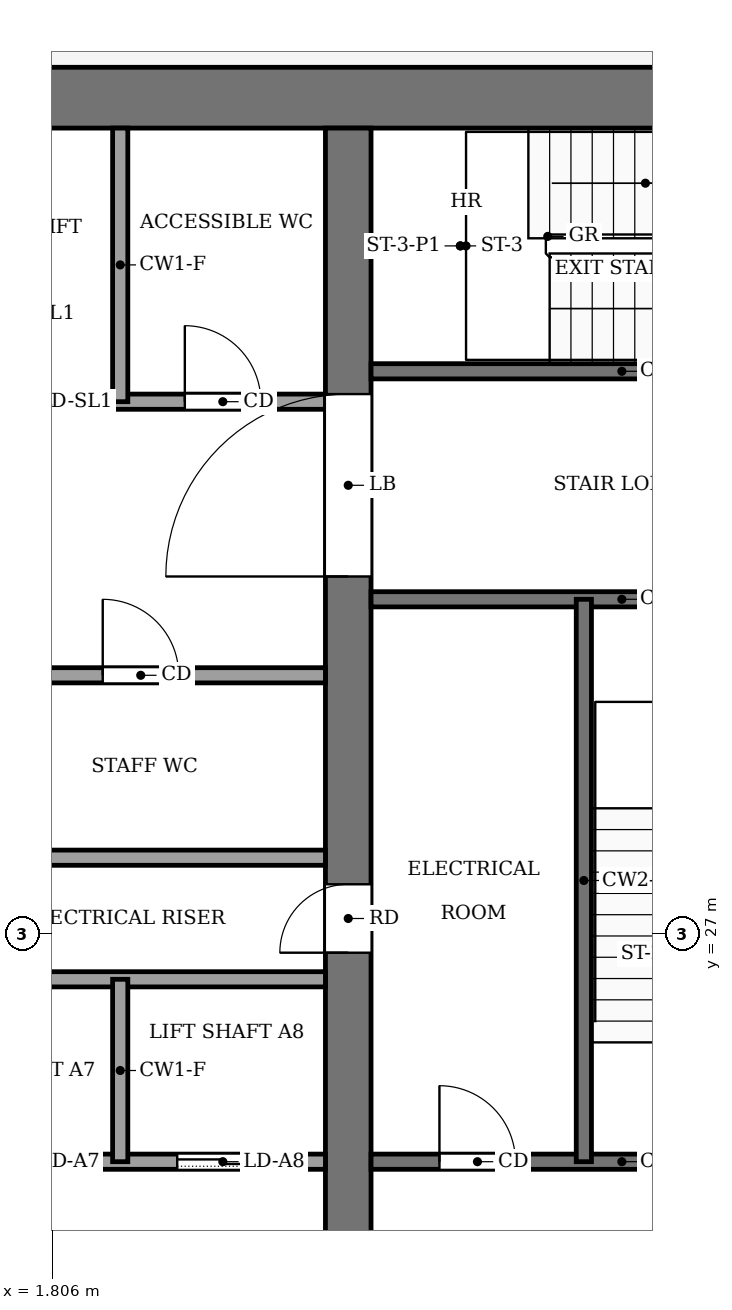
"""IFC4 building model, lengths in metres.
Left out: names, types, materials, properties, quantities, classifications, styles, units other than length and angle.
Written with IfcOpenShell. Run it as: python <this file> out.ifc"""

import sys

from ifc_helpers import new_model, si_unit, direction, frame, frame_2d, origin, place, context, subcontext, project, spatial, rectangle, extrude, element, fill, save


model = new_model("IFC4")
c1 = context("Model", 3, precision=1e-05, world=origin(), true_north=direction((0.0, 1.0)))
c2 = subcontext(c1, "Body", "Model", "MODEL_VIEW")
j1 = project(units=[si_unit("LENGTHUNIT", "METRE"), si_unit("PLANEANGLEUNIT", "RADIAN")], contexts=[c1])
p1 = place(None, origin())
s1 = spatial("IfcSite", under=j1, at=p1, CompositionType="ELEMENT")
p2 = place(p1, origin())
s2 = spatial("IfcBuilding", under=s1, at=p2, CompositionType="ELEMENT")
p3 = place(p2, frame((0.0, 0.0, 242.0)))
s3 = spatial("IfcBuildingStorey", under=s2, at=p3, CompositionType="ELEMENT", Elevation=242.0)
p4 = place(p3, frame((-13.4, 38.0, -0.13), z_axis=(0.0, 0.0, 1.0), x_axis=(1.0, 0.0, 0.0)))
e1 = element("IfcWall", 1, at=p4, inside=s3, PredefinedType="SHEAR", context=c2, shape_type="SweptSolid", body=[
    extrude(rectangle(XDim=26.8, YDim=0.8, at=frame_2d((13.4, 0.0))), origin(), (0.0, 0.0, 1.0), 4.0),
])
p5 = place(p3, frame((5.7, 18.4, -0.13), z_axis=(0.0, 0.0, 1.0), x_axis=(0.0, 1.0, 0.0)))
e2 = element("IfcWall", 2, at=p5, inside=s3, PredefinedType="SHEAR", context=c2, shape_type="SweptSolid", body=[
    extrude(rectangle(XDim=19.2, YDim=0.6, at=frame_2d((9.6, 0.0))), origin(), (0.0, 0.0, 1.0), 4.0),
])
p6 = place(p5, frame((8.35, 0.0, 0.13)))
e3 = element("IfcOpeningElement", 3, at=p6, cuts=e2, PredefinedType="OPENING", context=c2, shape_type="SweptSolid", body=[
    extrude(rectangle(XDim=0.9, YDim=2.1, at=frame_2d((0.45, 1.05))), frame((0.0, 0.31, 0.0), z_axis=(0.0, -1.0, 0.0), x_axis=(1.0, 0.0, 0.0)), (0.0, 0.0, 1.0), 0.62),
])
p7 = place(p5, frame((13.3, 0.0, 0.13)))
e4 = element("IfcOpeningElement", 4, at=p7, cuts=e2, PredefinedType="OPENING", context=c2, shape_type="SweptSolid", body=[
    extrude(rectangle(XDim=2.4, YDim=2.4, at=frame_2d((1.2, 1.2))), frame((0.0, 0.31, 0.0), z_axis=(0.0, -1.0, 0.0), x_axis=(1.0, 0.0, 0.0)), (0.0, 0.0, 1.0), 0.62),
])
p8 = place(p3, frame((-5.4, 24.0, 0.0), z_axis=(0.0, 0.0, 1.0), x_axis=(1.0, 0.0, 0.0)))
e5 = element("IfcWall", 5, at=p8, inside=s3, PredefinedType="PARTITIONING", context=c2, shape_type="SweptSolid", body=[
    extrude(rectangle(XDim=10.8, YDim=0.2, at=frame_2d((5.4, 0.0))), origin(), (0.0, 0.0, 1.0), 3.87),
])
p9 = place(p8, frame((0.75, 0.0, 0.0)))
e6 = element("IfcOpeningElement", 6, at=p9, cuts=e5, PredefinedType="OPENING", context=c2, shape_type="SweptSolid", body=[
    extrude(rectangle(XDim=1.2, YDim=2.2, at=frame_2d((0.6, 1.1))), frame((0.0, 0.11, 0.0), z_axis=(0.0, -1.0, 0.0), x_axis=(1.0, 0.0, 0.0)), (0.0, 0.0, 1.0), 0.22),
])
p10 = place(p8, frame((3.45, 0.0, 0.0)))
e7 = element("IfcOpeningElement", 7, at=p10, cuts=e5, PredefinedType="OPENING", context=c2, shape_type="SweptSolid", body=[
    extrude(rectangle(XDim=1.2, YDim=2.2, at=frame_2d((0.6, 1.1))), frame((0.0, 0.11, 0.0), z_axis=(0.0, -1.0, 0.0), x_axis=(1.0, 0.0, 0.0)), (0.0, 0.0, 1.0), 0.22),
])
p11 = place(p8, frame((6.15, 0.0, 0.0)))
e8 = element("IfcOpeningElement", 8, at=p11, cuts=e5, PredefinedType="OPENING", context=c2, shape_type="SweptSolid", body=[
    extrude(rectangle(XDim=1.2, YDim=2.2, at=frame_2d((0.6, 1.1))), frame((0.0, 0.11, 0.0), z_axis=(0.0, -1.0, 0.0), x_axis=(1.0, 0.0, 0.0)), (0.0, 0.0, 1.0), 0.22),
])
p12 = place(p8, frame((8.85, 0.0, 0.0)))
e9 = element("IfcOpeningElement", 9, at=p12, cuts=e5, PredefinedType="OPENING", context=c2, shape_type="SweptSolid", body=[
    extrude(rectangle(XDim=1.2, YDim=2.2, at=frame_2d((0.6, 1.1))), frame((0.0, 0.11, 0.0), z_axis=(0.0, -1.0, 0.0), x_axis=(1.0, 0.0, 0.0)), (0.0, 0.0, 1.0), 0.22),
])
p13 = place(p3, frame((6.0, 24.0, 0.0), z_axis=(0.0, 0.0, 1.0), x_axis=(1.0, 0.0, 0.0)))
e10 = element("IfcWall", 10, at=p13, inside=s3, PredefinedType="PARTITIONING", context=c2, shape_type="SweptSolid", body=[
    extrude(rectangle(XDim=6.6, YDim=0.2, at=frame_2d((3.3, 0.0))), origin(), (0.0, 0.0, 1.0), 3.87),
])
p14 = place(p13, frame((0.9, 0.0, 0.0)))
e11 = element("IfcOpeningElement", 11, at=p14, cuts=e10, PredefinedType="OPENING", context=c2, shape_type="SweptSolid", body=[
    extrude(rectangle(XDim=1.0, YDim=2.1, at=frame_2d((0.5, 1.05))), frame((0.0, 0.11, 0.0), z_axis=(0.0, -1.0, 0.0), x_axis=(1.0, 0.0, 0.0)), (0.0, 0.0, 1.0), 0.22),
])
p15 = place(p13, frame((4.4, 0.0, 0.0)))
e12 = element("IfcOpeningElement", 12, at=p15, cuts=e10, PredefinedType="OPENING", context=c2, shape_type="SweptSolid", body=[
    extrude(rectangle(XDim=1.2, YDim=2.2, at=frame_2d((0.6, 1.1))), frame((0.0, 0.11, 0.0), z_axis=(0.0, -1.0, 0.0), x_axis=(1.0, 0.0, 0.0)), (0.0, 0.0, 1.0), 0.22),
])
for number, where, z_axis, x_axis in (
    (13, (-5.4, 26.4, 0.0), (0.0, 0.0, 1.0), (1.0, 0.0, 0.0)),
    (14, (-5.4, 28.0, 0.0), (0.0, 0.0, 1.0), (1.0, 0.0, 0.0)),
):
    element("IfcWall", number, at=place(p3, frame(where, z_axis=z_axis, x_axis=x_axis)), inside=s3, PredefinedType="PARTITIONING", context=c2, shape_type="SweptSolid", body=[
        extrude(rectangle(XDim=10.8, YDim=0.2, at=frame_2d((5.4, 0.0))), origin(), (0.0, 0.0, 1.0), 3.87),
    ])
p16 = place(p3, frame((-5.4, 30.4, 0.0), z_axis=(0.0, 0.0, 1.0), x_axis=(1.0, 0.0, 0.0)))
e15 = element("IfcWall", 15, at=p16, inside=s3, PredefinedType="PARTITIONING", context=c2, shape_type="SweptSolid", body=[
    extrude(rectangle(XDim=10.8, YDim=0.2, at=frame_2d((5.4, 0.0))), origin(), (0.0, 0.0, 1.0), 3.87),
])
p17 = place(p16, frame((2.47, 0.0, 0.0)))
e16 = element("IfcOpeningElement", 16, at=p17, cuts=e15, PredefinedType="OPENING", context=c2, shape_type="SweptSolid", body=[
    extrude(rectangle(XDim=1.0, YDim=2.1, at=frame_2d((0.5, 1.05))), frame((0.0, 0.11, 0.0), z_axis=(0.0, -1.0, 0.0), x_axis=(1.0, 0.0, 0.0)), (0.0, 0.0, 1.0), 0.22),
])
p18 = place(p16, frame((7.87, 0.0, 0.0)))
e17 = element("IfcOpeningElement", 17, at=p18, cuts=e15, PredefinedType="OPENING", context=c2, shape_type="SweptSolid", body=[
    extrude(rectangle(XDim=1.0, YDim=2.1, at=frame_2d((0.5, 1.05))), frame((0.0, 0.11, 0.0), z_axis=(0.0, -1.0, 0.0), x_axis=(1.0, 0.0, 0.0)), (0.0, 0.0, 1.0), 0.22),
])
p19 = place(p3, frame((6.0, 31.4, 0.0), z_axis=(0.0, 0.0, 1.0), x_axis=(1.0, 0.0, 0.0)))
e18 = element("IfcWall", 18, at=p19, inside=s3, PredefinedType="PARTITIONING", context=c2, shape_type="SweptSolid", body=[
    extrude(rectangle(XDim=6.6, YDim=0.2, at=frame_2d((3.3, 0.0))), origin(), (0.0, 0.0, 1.0), 3.87),
])
p20 = place(p3, frame((-5.4, 34.0, 0.0), z_axis=(0.0, 0.0, 1.0), x_axis=(1.0, 0.0, 0.0)))
e19 = element("IfcWall", 19, at=p20, inside=s3, PredefinedType="PARTITIONING", context=c2, shape_type="SweptSolid", body=[
    extrude(rectangle(XDim=10.8, YDim=0.2, at=frame_2d((5.4, 0.0))), origin(), (0.0, 0.0, 1.0), 3.87),
])
p21 = place(p20, frame((6.15, 0.0, 0.0)))
e20 = element("IfcOpeningElement", 20, at=p21, cuts=e19, PredefinedType="OPENING", context=c2, shape_type="SweptSolid", body=[
    extrude(rectangle(XDim=1.2, YDim=2.2, at=frame_2d((0.6, 1.1))), frame((0.0, 0.11, 0.0), z_axis=(0.0, -1.0, 0.0), x_axis=(1.0, 0.0, 0.0)), (0.0, 0.0, 1.0), 0.22),
])
p22 = place(p20, frame((8.95, 0.0, 0.0)))
e21 = element("IfcOpeningElement", 21, at=p22, cuts=e19, PredefinedType="OPENING", context=c2, shape_type="SweptSolid", body=[
    extrude(rectangle(XDim=1.0, YDim=2.1, at=frame_2d((0.5, 1.05))), frame((0.0, 0.11, 0.0), z_axis=(0.0, -1.0, 0.0), x_axis=(1.0, 0.0, 0.0)), (0.0, 0.0, 1.0), 0.22),
])
p23 = place(p3, frame((6.0, 34.4, 0.0), z_axis=(0.0, 0.0, 1.0), x_axis=(1.0, 0.0, 0.0)))
e22 = element("IfcWall", 22, at=p23, inside=s3, PredefinedType="PARTITIONING", context=c2, shape_type="SweptSolid", body=[
    extrude(rectangle(XDim=6.6, YDim=0.2, at=frame_2d((3.3, 0.0))), origin(), (0.0, 0.0, 1.0), 3.87),
])
p24 = place(p23, frame((4.8, 0.0, 0.0)))
e23 = element("IfcOpeningElement", 23, at=p24, cuts=e22, PredefinedType="OPENING", context=c2, shape_type="SweptSolid", body=[
    extrude(rectangle(XDim=1.2, YDim=2.2, at=frame_2d((0.6, 1.1))), frame((0.0, 0.11, 0.0), z_axis=(0.0, -1.0, 0.0), x_axis=(1.0, 0.0, 0.0)), (0.0, 0.0, 1.0), 0.22),
])
p25 = place(p3, frame((2.7, 24.0, 0.0), z_axis=(0.0, 0.0, 1.0), x_axis=(0.0, 1.0, 0.0)))
e24 = element("IfcWall", 24, at=p25, inside=s3, PredefinedType="PARTITIONING", context=c2, shape_type="SweptSolid", body=[
    extrude(rectangle(XDim=2.4, YDim=0.2, at=frame_2d((1.2, 0.0))), origin(), (0.0, 0.0, 1.0), 3.87),
])
p26 = place(p3, frame((2.7, 34.0, 0.0), z_axis=(0.0, 0.0, 1.0), x_axis=(0.0, 1.0, 0.0)))
e25 = element("IfcWall", 25, at=p26, inside=s3, PredefinedType="PARTITIONING", context=c2, shape_type="SweptSolid", body=[
    extrude(rectangle(XDim=3.6, YDim=0.2, at=frame_2d((1.8, 0.0))), origin(), (0.0, 0.0, 1.0), 3.87),
])
p27 = place(p3, frame((8.8, 24.0, 0.0), z_axis=(0.0, 0.0, 1.0), x_axis=(0.0, 1.0, 0.0)))
e26 = element("IfcWall", 26, at=p27, inside=s3, PredefinedType="PARTITIONING", context=c2, shape_type="SweptSolid", body=[
    extrude(rectangle(XDim=7.4, YDim=0.2, at=frame_2d((3.7, 0.0))), origin(), (0.0, 0.0, 1.0), 3.87),
])
p28 = place(p11, origin())
e27 = element("IfcDoor", 27, at=p28, inside=s3, OperationType="SLIDING_TO_LEFT", PredefinedType="DOOR", context=c2, shape_type="SweptSolid", body=[
    extrude(rectangle(XDim=1.2, YDim=2.2, at=frame_2d((0.6, 1.1))), frame((0.0, 0.025, 0.0), z_axis=(0.0, -1.0, 0.0), x_axis=(1.0, 0.0, 0.0)), (0.0, 0.0, 1.0), 0.05),
])
fill(e8, e27)
p29 = place(p12, origin())
e28 = element("IfcDoor", 28, at=p29, inside=s3, OperationType="SLIDING_TO_LEFT", PredefinedType="DOOR", context=c2, shape_type="SweptSolid", body=[
    extrude(rectangle(XDim=1.2, YDim=2.2, at=frame_2d((0.6, 1.1))), frame((0.0, 0.025, 0.0), z_axis=(0.0, -1.0, 0.0), x_axis=(1.0, 0.0, 0.0)), (0.0, 0.0, 1.0), 0.05),
])
fill(e9, e28)
p30 = place(p21, origin())
e29 = element("IfcDoor", 29, at=p30, inside=s3, OperationType="SLIDING_TO_LEFT", PredefinedType="DOOR", context=c2, shape_type="SweptSolid", body=[
    extrude(rectangle(XDim=1.2, YDim=2.2, at=frame_2d((0.6, 1.1))), frame((0.0, 0.025, 0.0), z_axis=(0.0, -1.0, 0.0), x_axis=(1.0, 0.0, 0.0)), (0.0, 0.0, 1.0), 0.05),
])
fill(e20, e29)
p31 = place(p18, origin())
e30 = element("IfcDoor", 30, at=p31, inside=s3, OperationType="SINGLE_SWING_LEFT", PredefinedType="DOOR", context=c2, shape_type="SweptSolid", body=[
    extrude(rectangle(XDim=1.0, YDim=2.1, at=frame_2d((0.5, 1.05))), frame((0.0, 0.025, 0.0), z_axis=(0.0, -1.0, 0.0), x_axis=(1.0, 0.0, 0.0)), (0.0, 0.0, 1.0), 0.05),
])
fill(e17, e30)
p32 = place(p14, origin())
e31 = element("IfcDoor", 31, at=p32, inside=s3, OperationType="SINGLE_SWING_RIGHT", PredefinedType="DOOR", context=c2, shape_type="SweptSolid", body=[
    extrude(rectangle(XDim=1.0, YDim=2.1, at=frame_2d((0.5, 1.05))), frame((0.0, 0.025, 0.0), z_axis=(0.0, -1.0, 0.0), x_axis=(1.0, 0.0, 0.0)), (0.0, 0.0, 1.0), 0.05),
])
fill(e11, e31)
p33 = place(p22, origin())
e32 = element("IfcDoor", 32, at=p33, inside=s3, OperationType="SINGLE_SWING_LEFT", PredefinedType="DOOR", context=c2, shape_type="SweptSolid", body=[
    extrude(rectangle(XDim=1.0, YDim=2.1, at=frame_2d((0.5, 1.05))), frame((0.0, 0.025, 0.0), z_axis=(0.0, -1.0, 0.0), x_axis=(1.0, 0.0, 0.0)), (0.0, 0.0, 1.0), 0.05),
])
fill(e21, e32)
p34 = place(p6, origin())
e33 = element("IfcDoor", 33, at=p34, inside=s3, OperationType="SINGLE_SWING_RIGHT", PredefinedType="DOOR", context=c2, shape_type="SweptSolid", body=[
    extrude(rectangle(XDim=0.9, YDim=2.1, at=frame_2d((0.45, 1.05))), frame((0.0, 0.025, 0.0), z_axis=(0.0, -1.0, 0.0), x_axis=(1.0, 0.0, 0.0)), (0.0, 0.0, 1.0), 0.05),
])
fill(e3, e33)
p35 = place(p7, origin())
e34 = element("IfcDoor", 34, at=p35, inside=s3, OperationType="DOUBLE_DOOR_SINGLE_SWING", PredefinedType="DOOR", context=c2, shape_type="SweptSolid", body=[
    extrude(rectangle(XDim=2.4, YDim=2.4, at=frame_2d((1.2, 1.2))), frame((0.0, 0.025, 0.0), z_axis=(0.0, -1.0, 0.0), x_axis=(1.0, 0.0, 0.0)), (0.0, 0.0, 1.0), 0.05),
])
fill(e4, e34)
save(model, sys.argv[1])
